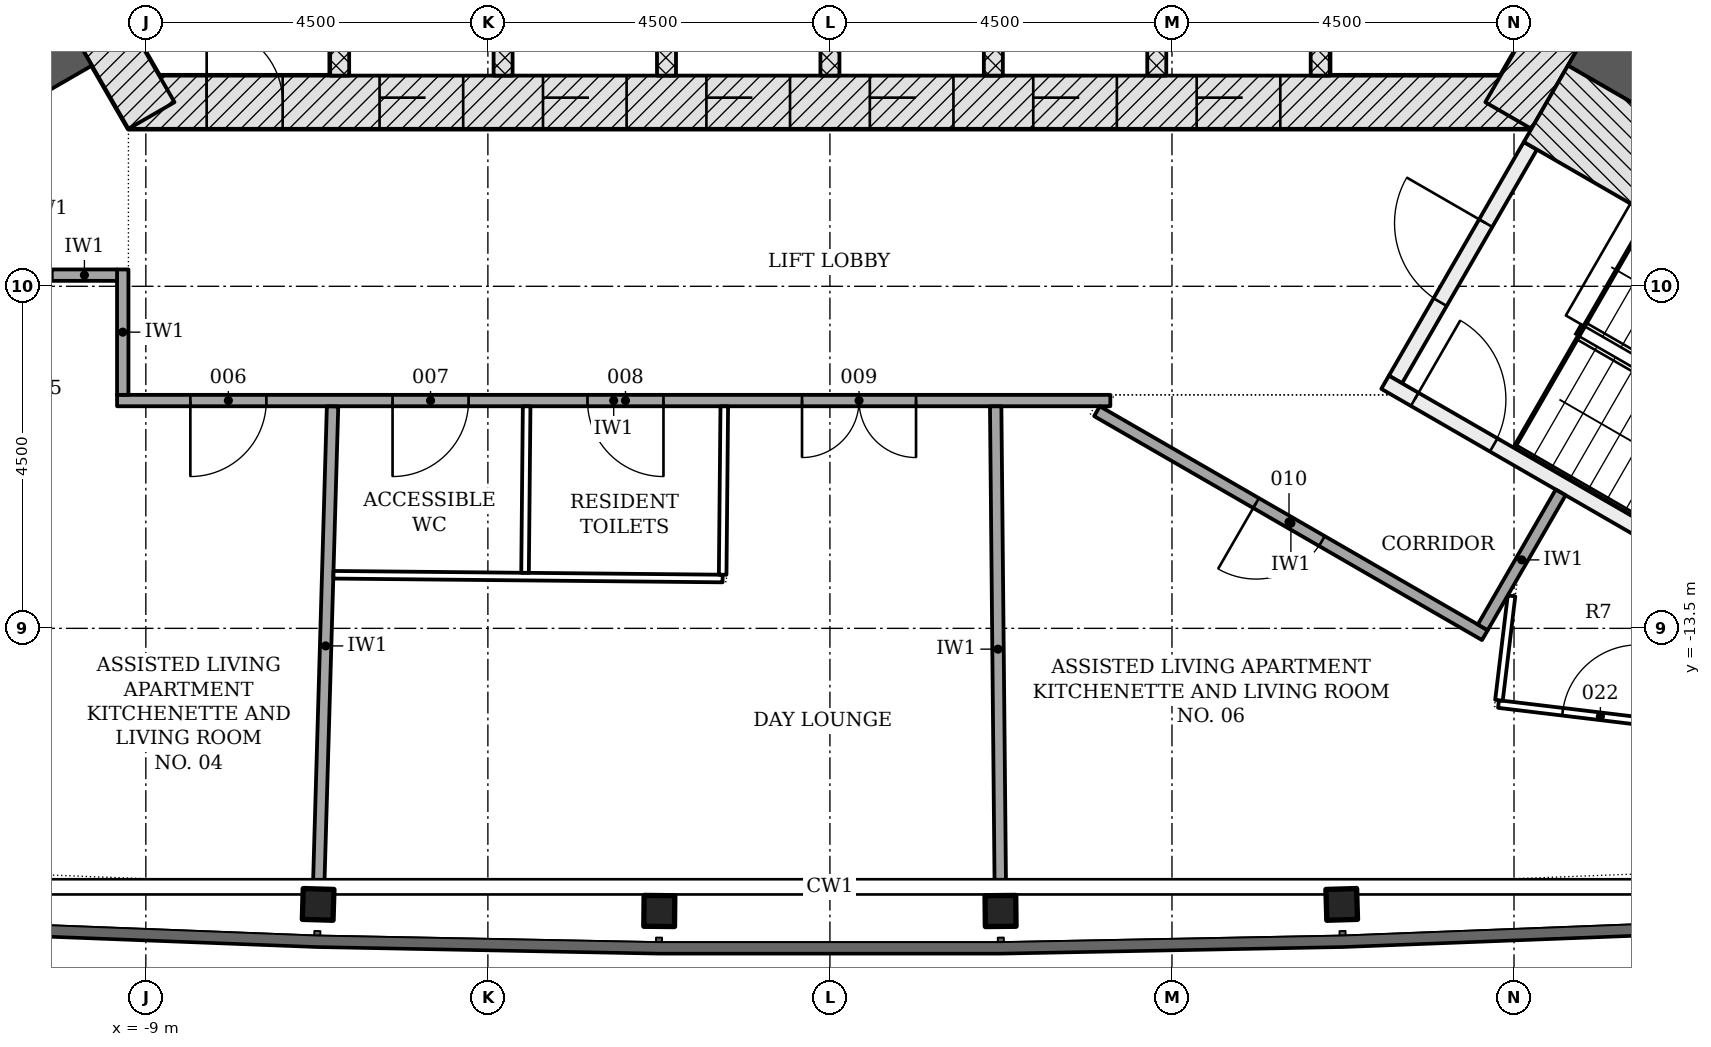
"""IFC4 building model, lengths in metres.
Left out: names, types, materials, properties, quantities, classifications, styles, units other than length and angle.
Written with IfcOpenShell. Run it as: python <this file> out.ifc"""

import sys

from ifc_helpers import new_model, si_unit, direction, frame, frame_2d, origin, origin_2d, place, context, subcontext, project, spatial, rectangle, i_section, extrude, element, fill, save


model = new_model("IFC4")
c1 = context("Model", 3, precision=1e-05, world=origin(), true_north=direction((0.0, 1.0)))
c2 = subcontext(c1, "Body", "Model", "MODEL_VIEW")
j1 = project(units=[si_unit("LENGTHUNIT", "METRE"), si_unit("PLANEANGLEUNIT", "RADIAN")], contexts=[c1])
p1 = place(None, origin())
s1 = spatial("IfcSite", under=j1, at=p1, CompositionType="ELEMENT")
p2 = place(p1, origin())
s2 = spatial("IfcBuilding", under=s1, at=p2, CompositionType="ELEMENT")
p3 = place(p2, frame((0.0, 0.0, 72.6)))
s3 = spatial("IfcBuildingStorey", under=s2, at=p3, CompositionType="ELEMENT", Elevation=72.6)
p4 = place(p3, frame((-9.229, -6.578, -0.2), z_axis=(0.0, 0.0, 1.0), x_axis=(1.0, 0.0, 0.0)))
e1 = element("IfcWall", 1, at=p4, inside=s3, PredefinedType="SHEAR", context=c2, shape_type="SweptSolid", body=[
    extrude(rectangle(XDim=18.458, YDim=0.7, at=frame_2d((9.229, 0.0))), origin(), (0.0, 0.0, 1.0), 3.6),
])
p5 = place(p4, frame((3.304, 0.0, 0.2)))
e2 = element("IfcOpeningElement", 2, at=p5, cuts=e1, PredefinedType="OPENING", context=c2, shape_type="SweptSolid", body=[
    extrude(rectangle(XDim=1.1, YDim=2.1, at=frame_2d((0.55, 1.05))), frame((0.0, 0.36, 0.0), z_axis=(0.0, -1.0, 0.0), x_axis=(1.0, 0.0, 0.0)), (0.0, 0.0, 1.0), 0.72),
])
p6 = place(p4, frame((5.454, 0.0, 0.2)))
e3 = element("IfcOpeningElement", 3, at=p6, cuts=e1, PredefinedType="OPENING", context=c2, shape_type="SweptSolid", body=[
    extrude(rectangle(XDim=1.1, YDim=2.1, at=frame_2d((0.55, 1.05))), frame((0.0, 0.36, 0.0), z_axis=(0.0, -1.0, 0.0), x_axis=(1.0, 0.0, 0.0)), (0.0, 0.0, 1.0), 0.72),
])
p7 = place(p4, frame((7.604, 0.0, 0.2)))
e4 = element("IfcOpeningElement", 4, at=p7, cuts=e1, PredefinedType="OPENING", context=c2, shape_type="SweptSolid", body=[
    extrude(rectangle(XDim=1.1, YDim=2.1, at=frame_2d((0.55, 1.05))), frame((0.0, 0.36, 0.0), z_axis=(0.0, -1.0, 0.0), x_axis=(1.0, 0.0, 0.0)), (0.0, 0.0, 1.0), 0.72),
])
p8 = place(p4, frame((9.754, 0.0, 0.2)))
e5 = element("IfcOpeningElement", 5, at=p8, cuts=e1, PredefinedType="OPENING", context=c2, shape_type="SweptSolid", body=[
    extrude(rectangle(XDim=1.1, YDim=2.1, at=frame_2d((0.55, 1.05))), frame((0.0, 0.36, 0.0), z_axis=(0.0, -1.0, 0.0), x_axis=(1.0, 0.0, 0.0)), (0.0, 0.0, 1.0), 0.72),
])
p9 = place(p4, frame((11.904, 0.0, 0.2)))
e6 = element("IfcOpeningElement", 6, at=p9, cuts=e1, PredefinedType="OPENING", context=c2, shape_type="SweptSolid", body=[
    extrude(rectangle(XDim=1.1, YDim=2.1, at=frame_2d((0.55, 1.05))), frame((0.0, 0.36, 0.0), z_axis=(0.0, -1.0, 0.0), x_axis=(1.0, 0.0, 0.0)), (0.0, 0.0, 1.0), 0.72),
])
p10 = place(p4, frame((14.054, 0.0, 0.2)))
e7 = element("IfcOpeningElement", 7, at=p10, cuts=e1, PredefinedType="OPENING", context=c2, shape_type="SweptSolid", body=[
    extrude(rectangle(XDim=1.1, YDim=2.1, at=frame_2d((0.55, 1.05))), frame((0.0, 0.36, 0.0), z_axis=(0.0, -1.0, 0.0), x_axis=(1.0, 0.0, 0.0)), (0.0, 0.0, 1.0), 0.72),
])
p11 = place(p4, frame((1.029, 0.0, 0.2)))
e8 = element("IfcOpeningElement", 8, at=p11, cuts=e1, PredefinedType="OPENING", context=c2, shape_type="SweptSolid", body=[
    extrude(rectangle(XDim=1.0, YDim=2.1, at=frame_2d((0.5, 1.05))), frame((0.0, 0.36, 0.0), z_axis=(0.0, -1.0, 0.0), x_axis=(1.0, 0.0, 0.0)), (0.0, 0.0, 1.0), 0.72),
])
for number, where, z_axis, x_axis in (
    (9, (8.926, -6.753, -0.2), (0.0, 0.0, 1.0), (0.5, 0.866, 0.0)),
    (10, (-10.311, -4.353, -0.2), (0.0, 0.0, 1.0), (0.5, -0.866, 0.0)),
):
    element("IfcWall", number, at=place(p3, frame(where, z_axis=z_axis, x_axis=x_axis)), inside=s3, PredefinedType="SHEAR", context=c2, shape_type="SweptSolid", body=[
        extrude(rectangle(XDim=2.771, YDim=0.7, at=frame_2d((1.386, 0.0))), origin(), (0.0, 0.0, 1.0), 3.6),
    ])
for number, where, z_axis, x_axis in (
    (11, (-9.922, -5.728, -0.2), (0.0, 0.0, 1.0), (-0.866, -0.5, 0.0)),
    (12, (9.922, -5.728, -0.2), (0.0, 0.0, 1.0), (0.866, -0.5, 0.0)),
):
    element("IfcWall", number, at=place(p3, frame(where, z_axis=z_axis, x_axis=x_axis)), inside=s3, PredefinedType="SHEAR", context=c2, shape_type="SweptSolid", body=[
        extrude(rectangle(XDim=13.381, YDim=0.85, at=frame_2d((6.691, 0.0))), origin(), (0.0, 0.0, 1.0), 3.6),
    ])
for number, where, z_axis, x_axis in (
    (13, (-6.733, -17.132, -0.2), (0.0, 0.0, 1.0), (1.0, -0.029, 0.0)),
    (14, (-2.245, -17.218, -0.2), (0.0, 0.0, 1.0), (1.0, -0.01, 0.0)),
    (15, (2.245, -17.218, -0.2), (0.0, 0.0, 1.0), (1.0, 0.01, 0.0)),
    (16, (6.733, -17.132, -0.2), (0.0, 0.0, 1.0), (1.0, 0.029, 0.0)),
):
    element("IfcColumn", number, at=place(p3, frame(where, z_axis=z_axis, x_axis=x_axis)), inside=s3, PredefinedType="COLUMN", context=c2, shape_type="SweptSolid", body=[
        extrude(i_section(OverallWidth=0.404, OverallDepth=0.406, WebThickness=0.027, FlangeThickness=0.044, FilletRadius=0.015, at=origin_2d()), origin(), (0.0, 0.0, 1.0), 3.6),
    ])
for number, where, z_axis, x_axis in (
    (17, (-6.45, -6.228, -0.2), (0.0, 0.0, 1.0), (0.0, 1.0, 0.0)),
    (18, (-4.3, -6.228, -0.2), (0.0, 0.0, 1.0), (0.0, 1.0, 0.0)),
    (19, (-2.15, -6.228, -0.2), (0.0, 0.0, 1.0), (0.0, 1.0, 0.0)),
    (20, (0.0, -6.228, -0.2), (0.0, 0.0, 1.0), (0.0, 1.0, 0.0)),
    (21, (2.15, -6.228, -0.2), (0.0, 0.0, 1.0), (0.0, 1.0, 0.0)),
    (22, (4.3, -6.228, -0.2), (0.0, 0.0, 1.0), (0.0, 1.0, 0.0)),
    (23, (6.45, -6.228, -0.2), (0.0, 0.0, 1.0), (0.0, 1.0, 0.0)),
):
    element("IfcWall", number, at=place(p3, frame(where, z_axis=z_axis, x_axis=x_axis)), inside=s3, PredefinedType="PARTITIONING", context=c2, shape_type="SweptSolid", body=[
        extrude(rectangle(XDim=2.5, YDim=0.25, at=frame_2d((1.25, 0.0))), origin(), (0.0, 0.0, 1.0), 3.6),
    ])
p12 = place(p3, frame((-10.424, -4.858, -0.2), z_axis=(0.0, 0.0, 1.0), x_axis=(-0.866033125095, -0.499986626058, 0.0)))
e24 = element("IfcWall", 24, at=p12, inside=s3, PredefinedType="SHEAR", context=c2, shape_type="SweptSolid", body=[
    extrude(rectangle(XDim=7.2, YDim=1.161, at=frame_2d((3.6, 0.0))), origin(), (0.0, 0.0, 1.0), 3.6),
])
p13 = place(p3, frame((7.44, -10.226, -0.2), z_axis=(0.0, 0.0, 1.0), x_axis=(0.500022077904, 0.866012656725, 0.0)))
e25 = element("IfcWall", 25, at=p13, inside=s3, PredefinedType="SHEAR", context=c2, shape_type="SweptSolid", body=[
    extrude(rectangle(XDim=3.55, YDim=0.2, at=frame_2d((1.775, 0.0))), origin(), (0.0, 0.0, 1.0), 3.6),
])
p14 = place(p13, frame((1.175, 0.0, 0.2)))
e26 = element("IfcOpeningElement", 26, at=p14, cuts=e25, PredefinedType="OPENING", context=c2, shape_type="SweptSolid", body=[
    extrude(rectangle(XDim=1.2, YDim=2.1, at=frame_2d((0.6, 1.05))), frame((0.0, 0.11, 0.0), z_axis=(0.0, -1.0, 0.0), x_axis=(1.0, 0.0, 0.0)), (0.0, 0.0, 1.0), 0.22),
])
p15 = place(p3, frame((7.304, -10.262, -0.2), z_axis=(0.0, 0.0, 1.0), x_axis=(0.866026594901, -0.49999793692, 0.0)))
e27 = element("IfcWall", 27, at=p15, inside=s3, PredefinedType="SHEAR", context=c2, shape_type="SweptSolid", body=[
    extrude(rectangle(XDim=5.6, YDim=0.2, at=frame_2d((2.8, 0.0))), origin(), (0.0, 0.0, 1.0), 3.6),
])
p16 = place(p15, frame((0.45, 0.0, 0.2)))
e28 = element("IfcOpeningElement", 28, at=p16, cuts=e27, PredefinedType="OPENING", context=c2, shape_type="SweptSolid", body=[
    extrude(rectangle(XDim=1.2, YDim=2.1, at=frame_2d((0.6, 1.05))), frame((0.0, 0.11, 0.0), z_axis=(0.0, -1.0, 0.0), x_axis=(1.0, 0.0, 0.0)), (0.0, 0.0, 1.0), 0.22),
])
p17 = place(p3, frame((9.419, -6.599, -0.2), z_axis=(0.0, 0.0, 1.0), x_axis=(0.866033125095, -0.499986626058, 0.0)))
e29 = element("IfcWall", 29, at=p17, inside=s3, PredefinedType="SHEAR", context=c2, shape_type="SweptSolid", body=[
    extrude(rectangle(XDim=7.2, YDim=1.161, at=frame_2d((3.6, 0.0))), origin(), (0.0, 0.0, 1.0), 3.6),
])
p18 = place(p3, frame((3.689, -10.503, 0.0), z_axis=(0.0, 0.0, 1.0), x_axis=(-1.0, 0.0, 0.0)))
e30 = element("IfcWall", 30, at=p18, inside=s3, PredefinedType="PARTITIONING", context=c2, shape_type="SweptSolid", body=[
    extrude(rectangle(XDim=13.068, YDim=0.15, at=frame_2d((6.534, 0.0))), origin(), (0.0, 0.0, 1.0), 2.778),
])
p19 = place(p18, frame((11.103, 0.0, 0.0)))
e31 = element("IfcOpeningElement", 31, at=p19, cuts=e30, PredefinedType="OPENING", context=c2, shape_type="SweptSolid", body=[
    extrude(rectangle(XDim=1.0, YDim=2.1, at=frame_2d((0.5, 1.05))), frame((0.0, 0.085, 0.0), z_axis=(0.0, -1.0, 0.0), x_axis=(1.0, 0.0, 0.0)), (0.0, 0.0, 1.0), 0.17),
])
p20 = place(p18, frame((8.443, 0.0, 0.0)))
e32 = element("IfcOpeningElement", 32, at=p20, cuts=e30, PredefinedType="OPENING", context=c2, shape_type="SweptSolid", body=[
    extrude(rectangle(XDim=1.0, YDim=2.1, at=frame_2d((0.5, 1.05))), frame((0.0, 0.085, 0.0), z_axis=(0.0, -1.0, 0.0), x_axis=(1.0, 0.0, 0.0)), (0.0, 0.0, 1.0), 0.17),
])
p21 = place(p18, frame((5.879, 0.0, 0.0)))
e33 = element("IfcOpeningElement", 33, at=p21, cuts=e30, PredefinedType="OPENING", context=c2, shape_type="SweptSolid", body=[
    extrude(rectangle(XDim=1.0, YDim=2.1, at=frame_2d((0.5, 1.05))), frame((0.0, 0.085, 0.0), z_axis=(0.0, -1.0, 0.0), x_axis=(1.0, 0.0, 0.0)), (0.0, 0.0, 1.0), 0.17),
])
p22 = place(p18, frame((2.556, 0.0, 0.0)))
e34 = element("IfcOpeningElement", 34, at=p22, cuts=e30, PredefinedType="OPENING", context=c2, shape_type="SweptSolid", body=[
    extrude(rectangle(XDim=1.5, YDim=2.1, at=frame_2d((0.75, 1.05))), frame((0.0, 0.085, 0.0), z_axis=(0.0, -1.0, 0.0), x_axis=(1.0, 0.0, 0.0)), (0.0, 0.0, 1.0), 0.17),
])
p23 = place(p3, frame((8.616, -13.589, 0.0), z_axis=(0.0, 0.0, 1.0), x_axis=(-0.866039313704, 0.499975906538, 0.0)))
e35 = element("IfcWall", 35, at=p23, inside=s3, PredefinedType="PARTITIONING", context=c2, shape_type="SweptSolid", body=[
    extrude(rectangle(XDim=5.892, YDim=0.15, at=frame_2d((2.946, 0.0))), origin(), (0.0, 0.0, 1.0), 2.778),
])
p24 = place(p23, frame((2.475, 0.0, 0.0)))
e36 = element("IfcOpeningElement", 36, at=p24, cuts=e35, PredefinedType="OPENING", context=c2, shape_type="SweptSolid", body=[
    extrude(rectangle(XDim=1.0, YDim=2.1, at=frame_2d((0.5, 1.05))), frame((0.0, 0.085, 0.0), z_axis=(0.0, -1.0, 0.0), x_axis=(1.0, 0.0, 0.0)), (0.0, 0.0, 1.0), 0.17),
])
p25 = place(p3, frame((8.589, -13.487, 0.0), z_axis=(0.0, 0.0, 1.0), x_axis=(0.499956128963, 0.866050731258, 0.0)))
e37 = element("IfcWall", 37, at=p25, inside=s3, PredefinedType="PARTITIONING", context=c2, shape_type="SweptSolid", body=[
    extrude(rectangle(XDim=2.05, YDim=0.15, at=frame_2d((1.025, 0.0))), origin(), (0.0, 0.0, 1.0), 3.4),
])
p26 = place(p3, frame((-9.304, -10.428, 0.0), z_axis=(0.0, 0.0, 1.0), x_axis=(0.0, 1.0, 0.0)))
e38 = element("IfcWall", 38, at=p26, inside=s3, PredefinedType="PARTITIONING", context=c2, shape_type="SweptSolid", body=[
    extrude(rectangle(XDim=1.65, YDim=0.15, at=frame_2d((0.825, 0.0))), origin(), (0.0, 0.0, 1.0), 3.4),
])
p27 = place(p3, frame((-10.238, -8.853, 0.0), z_axis=(0.0, 0.0, 1.0), x_axis=(1.0, 0.0, 0.0)))
e39 = element("IfcWall", 39, at=p27, inside=s3, PredefinedType="PARTITIONING", context=c2, shape_type="SweptSolid", body=[
    extrude(rectangle(XDim=0.859, YDim=0.15, at=frame_2d((0.43, 0.0))), origin(), (0.0, 0.0, 1.0), 3.4),
])
p28 = place(p3, frame((2.242, -16.968, 0.0), z_axis=(0.0, 0.0, 1.0), x_axis=(-0.009628532285, 0.999953644609, 0.0)))
e40 = element("IfcWall", 40, at=p28, inside=s3, PredefinedType="PARTITIONING", context=c2, shape_type="SweptSolid", body=[
    extrude(rectangle(XDim=6.39, YDim=0.15, at=frame_2d((3.195, 0.0))), origin(), (0.0, 0.0, 1.0), 2.778),
])
p29 = place(p3, frame((-6.726, -16.882, 0.0), z_axis=(0.0, 0.0, 1.0), x_axis=(0.028929036321, 0.999581467844, 0.0)))
e41 = element("IfcWall", 41, at=p29, inside=s3, PredefinedType="PARTITIONING", context=c2, shape_type="SweptSolid", body=[
    extrude(rectangle(XDim=6.304, YDim=0.15, at=frame_2d((3.152, 0.0))), origin(), (0.0, 0.0, 1.0), 2.778),
])
p30 = place(p3, frame((-6.531, -12.795, 0.0), z_axis=(0.0, 0.0, 1.0), x_axis=(0.99995315176, -0.009679580841, 0.0)))
e42 = element("IfcWall", 42, at=p30, inside=s3, PredefinedType="PARTITIONING", context=c2, shape_type="SweptSolid", body=[
    extrude(rectangle(XDim=5.12, YDim=0.1, at=frame_2d((2.56, 0.0))), origin(), (0.0, 0.0, 1.0), 2.778),
])
p31 = place(p3, frame((8.796, -14.496, 0.0), z_axis=(0.0, 0.0, 1.0), x_axis=(0.992835802838, -0.119486687973, 0.0)))
e43 = element("IfcWall", 43, at=p31, inside=s3, PredefinedType="PARTITIONING", context=c2, shape_type="SweptSolid", body=[
    extrude(rectangle(XDim=2.65, YDim=0.1, at=frame_2d((1.325, 0.0))), origin(), (0.0, 0.0, 1.0), 2.923),
])
p32 = place(p31, frame((0.85, 0.0, 0.0)))
e44 = element("IfcOpeningElement", 44, at=p32, cuts=e43, PredefinedType="OPENING", context=c2, shape_type="SweptSolid", body=[
    extrude(rectangle(XDim=1.0, YDim=2.1, at=frame_2d((0.5, 1.05))), frame((0.0, 0.06, 0.0), z_axis=(0.0, -1.0, 0.0), x_axis=(1.0, 0.0, 0.0)), (0.0, 0.0, 1.0), 0.12),
])
p33 = place(p3, frame((-1.411, -12.794, 0.0), z_axis=(0.0, 0.0, 1.0), x_axis=(0.009585280215, 0.999954060146, 0.0)))
e45 = element("IfcWall", 45, at=p33, inside=s3, PredefinedType="PARTITIONING", context=c2, shape_type="SweptSolid", body=[
    extrude(rectangle(XDim=2.216, YDim=0.1, at=frame_2d((1.108, 0.0))), origin(), (0.0, 0.0, 1.0), 3.4),
])
p34 = place(p3, frame((-4.011, -12.769, 0.0), z_axis=(0.0, 0.0, 1.0), x_axis=(0.009583868309, 0.99995407368, 0.0)))
e46 = element("IfcWall", 46, at=p34, inside=s3, PredefinedType="PARTITIONING", context=c2, shape_type="SweptSolid", body=[
    extrude(rectangle(XDim=2.191, YDim=0.1, at=frame_2d((1.095, 0.0))), origin(), (0.0, 0.0, 1.0), 3.4),
])
p35 = place(p3, frame((8.967, -13.073, 0.0), z_axis=(0.0, 0.0, 1.0), x_axis=(-0.119493210152, -0.992835017879, 0.0)))
e47 = element("IfcWall", 47, at=p35, inside=s3, PredefinedType="PARTITIONING", context=c2, shape_type="SweptSolid", body=[
    extrude(rectangle(XDim=1.383, YDim=0.1, at=frame_2d((0.692, 0.0))), origin(), (0.0, 0.0, 1.0), 3.4),
])
p36 = place(p5, origin())
e48 = element("IfcDoor", 48, at=p36, inside=s3, OperationType="DOUBLE_DOOR_SLIDING", PredefinedType="DOOR", context=c2, shape_type="SweptSolid", body=[
    extrude(rectangle(XDim=1.1, YDim=2.1, at=frame_2d((0.55, 1.05))), frame((0.0, 0.025, 0.0), z_axis=(0.0, -1.0, 0.0), x_axis=(1.0, 0.0, 0.0)), (0.0, 0.0, 1.0), 0.05),
])
fill(e2, e48)
p37 = place(p6, origin())
e49 = element("IfcDoor", 49, at=p37, inside=s3, OperationType="DOUBLE_DOOR_SLIDING", PredefinedType="DOOR", context=c2, shape_type="SweptSolid", body=[
    extrude(rectangle(XDim=1.1, YDim=2.1, at=frame_2d((0.55, 1.05))), frame((0.0, 0.025, 0.0), z_axis=(0.0, -1.0, 0.0), x_axis=(1.0, 0.0, 0.0)), (0.0, 0.0, 1.0), 0.05),
])
fill(e3, e49)
p38 = place(p7, origin())
e50 = element("IfcDoor", 50, at=p38, inside=s3, OperationType="DOUBLE_DOOR_SLIDING", PredefinedType="DOOR", context=c2, shape_type="SweptSolid", body=[
    extrude(rectangle(XDim=1.1, YDim=2.1, at=frame_2d((0.55, 1.05))), frame((0.0, 0.025, 0.0), z_axis=(0.0, -1.0, 0.0), x_axis=(1.0, 0.0, 0.0)), (0.0, 0.0, 1.0), 0.05),
])
fill(e4, e50)
p39 = place(p8, origin())
e51 = element("IfcDoor", 51, at=p39, inside=s3, OperationType="DOUBLE_DOOR_SLIDING", PredefinedType="DOOR", context=c2, shape_type="SweptSolid", body=[
    extrude(rectangle(XDim=1.1, YDim=2.1, at=frame_2d((0.55, 1.05))), frame((0.0, 0.025, 0.0), z_axis=(0.0, -1.0, 0.0), x_axis=(1.0, 0.0, 0.0)), (0.0, 0.0, 1.0), 0.05),
])
fill(e5, e51)
p40 = place(p9, origin())
e52 = element("IfcDoor", 52, at=p40, inside=s3, OperationType="DOUBLE_DOOR_SLIDING", PredefinedType="DOOR", context=c2, shape_type="SweptSolid", body=[
    extrude(rectangle(XDim=1.1, YDim=2.1, at=frame_2d((0.55, 1.05))), frame((0.0, 0.025, 0.0), z_axis=(0.0, -1.0, 0.0), x_axis=(1.0, 0.0, 0.0)), (0.0, 0.0, 1.0), 0.05),
])
fill(e6, e52)
p41 = place(p10, origin())
e53 = element("IfcDoor", 53, at=p41, inside=s3, OperationType="DOUBLE_DOOR_SLIDING", PredefinedType="DOOR", context=c2, shape_type="SweptSolid", body=[
    extrude(rectangle(XDim=1.1, YDim=2.1, at=frame_2d((0.55, 1.05))), frame((0.0, 0.025, 0.0), z_axis=(0.0, -1.0, 0.0), x_axis=(1.0, 0.0, 0.0)), (0.0, 0.0, 1.0), 0.05),
])
fill(e7, e53)
p42 = place(p11, origin())
e54 = element("IfcDoor", 54, at=p42, inside=s3, OperationType="SINGLE_SWING_LEFT", PredefinedType="DOOR", context=c2, shape_type="SweptSolid", body=[
    extrude(rectangle(XDim=1.0, YDim=2.1, at=frame_2d((0.5, 1.05))), frame((0.0, 0.075, 0.0), z_axis=(0.0, -1.0, 0.0), x_axis=(1.0, 0.0, 0.0)), (0.0, 0.0, 1.0), 0.15),
])
fill(e8, e54)
p43 = place(p14, origin())
e55 = element("IfcDoor", 55, at=p43, inside=s3, OperationType="SINGLE_SWING_RIGHT", PredefinedType="DOOR", context=c2, shape_type="SweptSolid", body=[
    extrude(rectangle(XDim=1.2, YDim=2.1, at=frame_2d((0.6, 1.05))), frame((0.0, 0.025, 0.0), z_axis=(0.0, -1.0, 0.0), x_axis=(1.0, 0.0, 0.0)), (0.0, 0.0, 1.0), 0.05),
])
fill(e26, e55)
p44 = place(p16, origin())
e56 = element("IfcDoor", 56, at=p44, inside=s3, OperationType="SINGLE_SWING_LEFT", PredefinedType="DOOR", context=c2, shape_type="SweptSolid", body=[
    extrude(rectangle(XDim=1.2, YDim=2.1, at=frame_2d((0.6, 1.05))), frame((0.0, 0.025, 0.0), z_axis=(0.0, -1.0, 0.0), x_axis=(1.0, 0.0, 0.0)), (0.0, 0.0, 1.0), 0.05),
])
fill(e28, e56)
p45 = place(p19, origin())
e57 = element("IfcDoor", 57, at=p45, inside=s3, OperationType="SINGLE_SWING_RIGHT", PredefinedType="DOOR", context=c2, shape_type="SweptSolid", body=[
    extrude(rectangle(XDim=1.0, YDim=2.1, at=frame_2d((0.5, 1.05))), frame((0.0, 0.025, 0.0), z_axis=(0.0, -1.0, 0.0), x_axis=(1.0, 0.0, 0.0)), (0.0, 0.0, 1.0), 0.05),
])
fill(e31, e57)
p46 = place(p20, origin())
e58 = element("IfcDoor", 58, at=p46, inside=s3, OperationType="SINGLE_SWING_RIGHT", PredefinedType="DOOR", context=c2, shape_type="SweptSolid", body=[
    extrude(rectangle(XDim=1.0, YDim=2.1, at=frame_2d((0.5, 1.05))), frame((0.0, 0.025, 0.0), z_axis=(0.0, -1.0, 0.0), x_axis=(1.0, 0.0, 0.0)), (0.0, 0.0, 1.0), 0.05),
])
fill(e32, e58)
p47 = place(p21, origin())
e59 = element("IfcDoor", 59, at=p47, inside=s3, OperationType="SINGLE_SWING_LEFT", PredefinedType="DOOR", context=c2, shape_type="SweptSolid", body=[
    extrude(rectangle(XDim=1.0, YDim=2.1, at=frame_2d((0.5, 1.05))), frame((0.0, 0.025, 0.0), z_axis=(0.0, -1.0, 0.0), x_axis=(1.0, 0.0, 0.0)), (0.0, 0.0, 1.0), 0.05),
])
fill(e33, e59)
p48 = place(p22, origin())
e60 = element("IfcDoor", 60, at=p48, inside=s3, OperationType="DOUBLE_DOOR_SINGLE_SWING", PredefinedType="DOOR", context=c2, shape_type="SweptSolid", body=[
    extrude(rectangle(XDim=1.5, YDim=2.1, at=frame_2d((0.75, 1.05))), frame((0.0, 0.025, 0.0), z_axis=(0.0, -1.0, 0.0), x_axis=(1.0, 0.0, 0.0)), (0.0, 0.0, 1.0), 0.05),
])
fill(e34, e60)
p49 = place(p24, origin())
e61 = element("IfcDoor", 61, at=p49, inside=s3, OperationType="SINGLE_SWING_RIGHT", PredefinedType="DOOR", context=c2, shape_type="SweptSolid", body=[
    extrude(rectangle(XDim=1.0, YDim=2.1, at=frame_2d((0.5, 1.05))), frame((0.0, 0.025, 0.0), z_axis=(0.0, -1.0, 0.0), x_axis=(1.0, 0.0, 0.0)), (0.0, 0.0, 1.0), 0.05),
])
fill(e36, e61)
p50 = place(p32, origin())
e62 = element("IfcDoor", 62, at=p50, inside=s3, OperationType="SINGLE_SWING_RIGHT", PredefinedType="DOOR", context=c2, shape_type="SweptSolid", body=[
    extrude(rectangle(XDim=1.0, YDim=2.1, at=frame_2d((0.5, 1.05))), frame((0.0, 0.025, 0.0), z_axis=(0.0, -1.0, 0.0), x_axis=(1.0, 0.0, 0.0)), (0.0, 0.0, 1.0), 0.05),
])
fill(e44, e62)
save(model, sys.argv[1])
